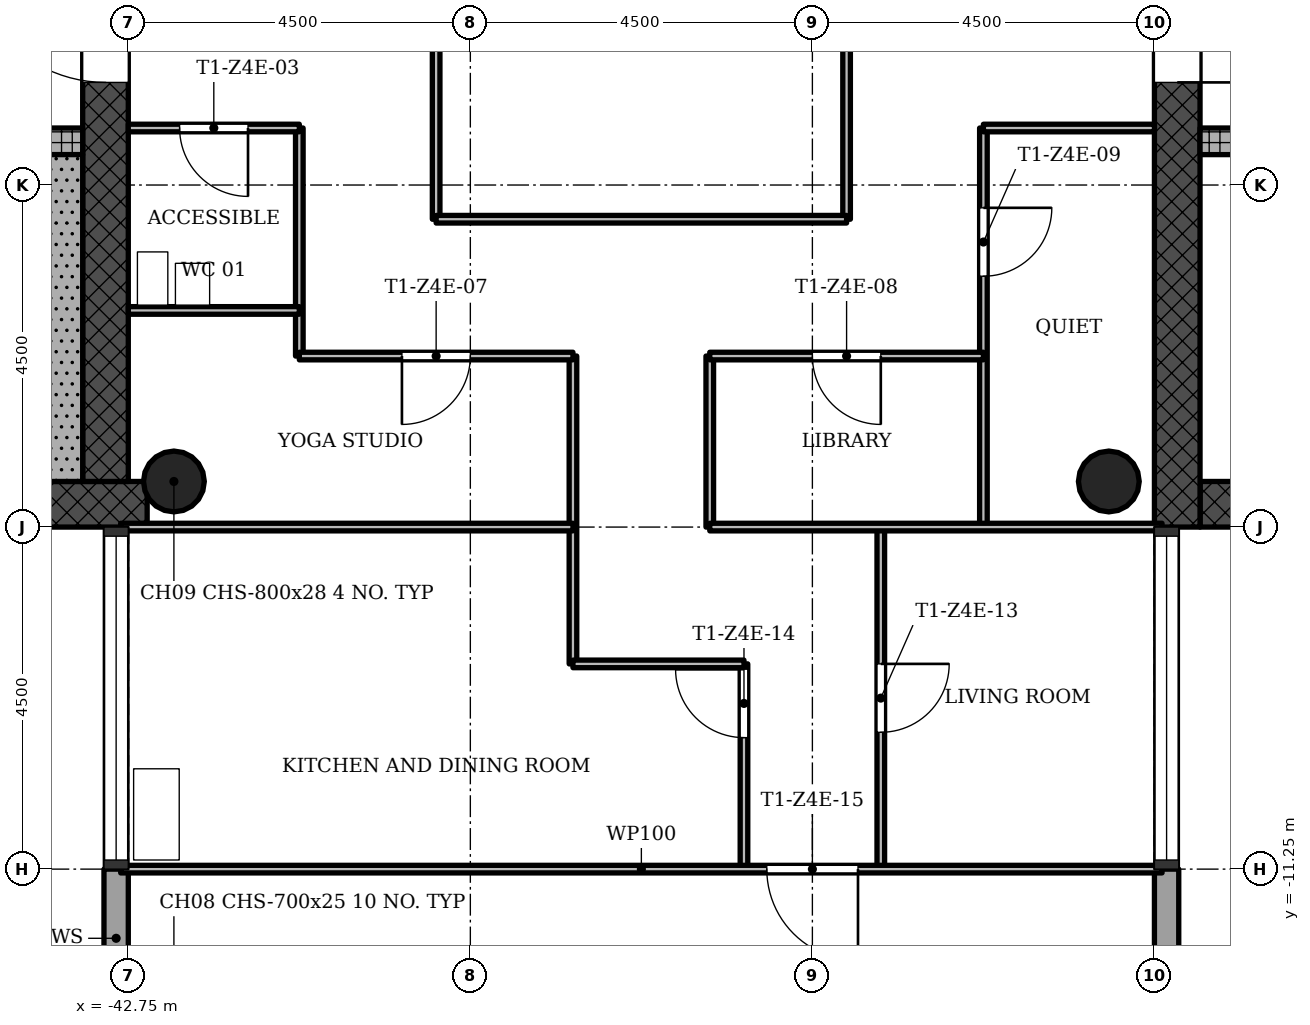
"""IFC4 building model, lengths in metres.
Left out: names, types, materials, properties, quantities, classifications, styles, units other than length and angle.
Written with IfcOpenShell. Run it as: python <this file> out.ifc"""

import sys

from ifc_helpers import new_model, si_unit, direction, frame, frame_2d, origin, origin_2d, place, context, subcontext, project, spatial, rectangle, hollow_circle, extrude, element, fill, save


model = new_model("IFC4")
c1 = context("Model", 3, precision=1e-05, world=origin(), true_north=direction((0.0, 1.0)))
c2 = subcontext(c1, "Body", "Model", "MODEL_VIEW")
j1 = project(units=[si_unit("LENGTHUNIT", "METRE"), si_unit("PLANEANGLEUNIT", "RADIAN")], contexts=[c1])
p1 = place(None, origin())
s1 = spatial("IfcSite", under=j1, at=p1, CompositionType="ELEMENT")
p2 = place(p1, origin())
s2 = spatial("IfcBuilding", under=s1, at=p2, CompositionType="ELEMENT")
p3 = place(p2, frame((0.0, 0.0, 213.0)))
s3 = spatial("IfcBuildingStorey", under=s2, at=p3, CompositionType="ELEMENT", Elevation=213.0)
p4 = place(p3, frame((-28.65, -6.45, 0.0), z_axis=(0.0, 0.0, 1.0), x_axis=(1.0, 0.0, 0.0)))
e1 = element("IfcWall", 1, at=p4, inside=s3, PredefinedType="SHEAR", context=c2, shape_type="SweptSolid", body=[
    extrude(rectangle(XDim=8.4, YDim=0.6, at=frame_2d((4.2, 0.0))), origin(), (0.0, 0.0, 1.0), 3.4),
])
p5 = place(p3, frame((-28.95, 6.15, 0.0), z_axis=(0.0, 0.0, 1.0), x_axis=(0.0, -1.0, 0.0)))
e2 = element("IfcWall", 2, at=p5, inside=s3, PredefinedType="SHEAR", context=c2, shape_type="SweptSolid", body=[
    extrude(rectangle(XDim=12.9, YDim=0.6, at=frame_2d((6.45, 0.0))), origin(), (0.0, 0.0, 1.0), 3.4),
])
p6 = place(p5, frame((5.25, 0.0, 0.0)))
e3 = element("IfcOpeningElement", 3, at=p6, cuts=e2, PredefinedType="OPENING", context=c2, shape_type="SweptSolid", body=[
    extrude(rectangle(XDim=1.8, YDim=2.1, at=frame_2d((0.9, 1.05))), frame((0.0, 0.31, 0.0), z_axis=(0.0, -1.0, 0.0), x_axis=(1.0, 0.0, 0.0)), (0.0, 0.0, 1.0), 0.62),
])
p7 = place(p3, frame((-28.65, -1.675, 0.0), z_axis=(0.0, 0.0, 1.0), x_axis=(1.0, 0.0, 0.0)))
e4 = element("IfcWall", 4, at=p7, inside=s3, PredefinedType="SHEAR", context=c2, shape_type="SweptSolid", body=[
    extrude(rectangle(XDim=7.8, YDim=0.35, at=frame_2d((3.9, 0.0))), origin(), (0.0, 0.0, 1.0), 3.4),
])
p8 = place(p7, frame((1.15, 0.0, 0.0)))
e5 = element("IfcOpeningElement", 5, at=p8, cuts=e4, PredefinedType="OPENING", context=c2, shape_type="SweptSolid", body=[
    extrude(rectangle(XDim=1.1, YDim=2.1, at=frame_2d((0.55, 1.05))), frame((0.0, 0.185, 0.0), z_axis=(0.0, -1.0, 0.0), x_axis=(1.0, 0.0, 0.0)), (0.0, 0.0, 1.0), 0.37),
])
p9 = place(p7, frame((3.35, 0.0, 0.0)))
e6 = element("IfcOpeningElement", 6, at=p9, cuts=e4, PredefinedType="OPENING", context=c2, shape_type="SweptSolid", body=[
    extrude(rectangle(XDim=1.1, YDim=2.1, at=frame_2d((0.55, 1.05))), frame((0.0, 0.185, 0.0), z_axis=(0.0, -1.0, 0.0), x_axis=(1.0, 0.0, 0.0)), (0.0, 0.0, 1.0), 0.37),
])
p10 = place(p7, frame((5.55, 0.0, 0.0)))
e7 = element("IfcOpeningElement", 7, at=p10, cuts=e4, PredefinedType="OPENING", context=c2, shape_type="SweptSolid", body=[
    extrude(rectangle(XDim=1.1, YDim=2.1, at=frame_2d((0.55, 1.05))), frame((0.0, 0.185, 0.0), z_axis=(0.0, -1.0, 0.0), x_axis=(1.0, 0.0, 0.0)), (0.0, 0.0, 1.0), 0.37),
])
p11 = place(p3, frame((-51.15, -6.45, 0.0), z_axis=(0.0, 0.0, 1.0), x_axis=(1.0, 0.0, 0.0)))
e8 = element("IfcWall", 8, at=p11, inside=s3, PredefinedType="SHEAR", context=c2, shape_type="SweptSolid", body=[
    extrude(rectangle(XDim=8.648, YDim=0.6, at=frame_2d((4.324, 0.0))), origin(), (0.0, 0.0, 1.0), 3.4),
])
p12 = place(p3, frame((-43.05, -6.15, 0.0), z_axis=(0.0, 0.0, 1.0), x_axis=(0.0, 1.0, 0.0)))
e9 = element("IfcWall", 9, at=p12, inside=s3, PredefinedType="SHEAR", context=c2, shape_type="SweptSolid", body=[
    extrude(rectangle(XDim=12.9, YDim=0.6, at=frame_2d((6.45, 0.0))), origin(), (0.0, 0.0, 1.0), 3.4),
])
p13 = place(p12, frame((5.25, 0.0, 0.0)))
e10 = element("IfcOpeningElement", 10, at=p13, cuts=e9, PredefinedType="OPENING", context=c2, shape_type="SweptSolid", body=[
    extrude(rectangle(XDim=1.8, YDim=2.1, at=frame_2d((0.9, 1.05))), frame((0.0, 0.31, 0.0), z_axis=(0.0, -1.0, 0.0), x_axis=(1.0, 0.0, 0.0)), (0.0, 0.0, 1.0), 0.62),
])
p14 = place(p3, frame((-51.15, -1.675, 0.0), z_axis=(0.0, 0.0, 1.0), x_axis=(1.0, 0.0, 0.0)))
e11 = element("IfcWall", 11, at=p14, inside=s3, PredefinedType="SHEAR", context=c2, shape_type="SweptSolid", body=[
    extrude(rectangle(XDim=7.8, YDim=0.35, at=frame_2d((3.9, 0.0))), origin(), (0.0, 0.0, 1.0), 3.4),
])
p15 = place(p14, frame((5.85, 0.0, 0.0)))
e12 = element("IfcOpeningElement", 12, at=p15, cuts=e11, PredefinedType="OPENING", context=c2, shape_type="SweptSolid", body=[
    extrude(rectangle(XDim=0.9, YDim=2.1, at=frame_2d((0.45, 1.05))), frame((0.0, 0.185, 0.0), z_axis=(0.0, -1.0, 0.0), x_axis=(1.0, 0.0, 0.0)), (0.0, 0.0, 1.0), 0.37),
])
for number, where, z_axis, x_axis in (
    (13, (-42.15, -6.15, 0.0), (0.0, 0.0, 1.0), (1.0, 0.0, 0.0)),
    (14, (-29.85, -6.15, 0.0), (0.0, 0.0, 1.0), (1.0, 0.0, 0.0)),
):
    element("IfcColumn", number, at=place(p3, frame(where, z_axis=z_axis, x_axis=x_axis)), inside=s3, PredefinedType="COLUMN", context=c2, shape_type="SweptSolid", body=[
        extrude(hollow_circle(Radius=0.4, WallThickness=0.028, at=origin_2d()), origin(), (0.0, 0.0, 1.0), 3.4),
    ])
p16 = place(p3, frame((-42.91, -11.25, -0.3), z_axis=(0.0, 0.0, 1.0), x_axis=(0.0, -1.0, 0.0)))
e15 = element("IfcWall", 15, at=p16, inside=s3, PredefinedType="STANDARD", context=c2, shape_type="SweptSolid", body=[
    extrude(rectangle(XDim=1.82, YDim=0.32, at=frame_2d((0.91, 0.0))), origin(), (0.0, 0.0, 1.0), 3.4),
])
p17 = place(p3, frame((-29.09, -12.75, -0.3), z_axis=(0.0, 0.0, 1.0), x_axis=(0.0, 1.0, 0.0)))
e16 = element("IfcWall", 16, at=p17, inside=s3, PredefinedType="STANDARD", context=c2, shape_type="SweptSolid", body=[
    extrude(rectangle(XDim=1.5, YDim=0.32, at=frame_2d((0.75, 0.0))), origin(), (0.0, 0.0, 1.0), 3.4),
])
p18 = place(p3, frame((-40.5, -4.5, 0.0), z_axis=(0.0, 0.0, 1.0), x_axis=(0.0, 1.0, 0.0)))
e17 = element("IfcWall", 17, at=p18, inside=s3, PredefinedType="PARTITIONING", context=c2, shape_type="SweptSolid", body=[
    extrude(rectangle(XDim=3.0, YDim=0.1, at=frame_2d((1.5, 0.0))), origin(), (0.0, 0.0, 1.0), 3.0),
])
p19 = place(p3, frame((-38.7, -2.7, 0.0), z_axis=(0.0, 0.0, 1.0), x_axis=(0.0, 1.0, 0.0)))
e18 = element("IfcWall", 18, at=p19, inside=s3, PredefinedType="PARTITIONING", context=c2, shape_type="SweptSolid", body=[
    extrude(rectangle(XDim=5.4, YDim=0.1, at=frame_2d((2.7, 0.0))), origin(), (0.0, 0.0, 1.0), 3.0),
])
p20 = place(p3, frame((-36.9, -8.55, 0.0), z_axis=(0.0, 0.0, 1.0), x_axis=(0.0, 1.0, 0.0)))
e19 = element("IfcWall", 19, at=p20, inside=s3, PredefinedType="PARTITIONING", context=c2, shape_type="SweptSolid", body=[
    extrude(rectangle(XDim=4.05, YDim=0.1, at=frame_2d((2.025, 0.0))), origin(), (0.0, 0.0, 1.0), 3.0),
])
p21 = place(p3, frame((-35.1, -6.75, 0.0), z_axis=(0.0, 0.0, 1.0), x_axis=(0.0, 1.0, 0.0)))
e20 = element("IfcWall", 20, at=p21, inside=s3, PredefinedType="PARTITIONING", context=c2, shape_type="SweptSolid", body=[
    extrude(rectangle(XDim=2.25, YDim=0.1, at=frame_2d((1.125, 0.0))), origin(), (0.0, 0.0, 1.0), 3.0),
])
p22 = place(p3, frame((-34.65, -11.25, 0.0), z_axis=(0.0, 0.0, 1.0), x_axis=(0.0, 1.0, 0.0)))
e21 = element("IfcWall", 21, at=p22, inside=s3, PredefinedType="PARTITIONING", context=c2, shape_type="SweptSolid", body=[
    extrude(rectangle(XDim=2.7, YDim=0.1, at=frame_2d((1.35, 0.0))), origin(), (0.0, 0.0, 1.0), 3.0),
])
p23 = place(p22, frame((1.73, 0.0, 0.0)))
e22 = element("IfcOpeningElement", 22, at=p23, cuts=e21, PredefinedType="OPENING", context=c2, shape_type="SweptSolid", body=[
    extrude(rectangle(XDim=0.9, YDim=2.1, at=frame_2d((0.45, 1.05))), frame((0.0, 0.06, 0.0), z_axis=(0.0, -1.0, 0.0), x_axis=(1.0, 0.0, 0.0)), (0.0, 0.0, 1.0), 0.12),
])
p24 = place(p3, frame((-33.3, -2.7, 0.0), z_axis=(0.0, 0.0, 1.0), x_axis=(0.0, 1.0, 0.0)))
e23 = element("IfcWall", 23, at=p24, inside=s3, PredefinedType="PARTITIONING", context=c2, shape_type="SweptSolid", body=[
    extrude(rectangle(XDim=5.4, YDim=0.1, at=frame_2d((2.7, 0.0))), origin(), (0.0, 0.0, 1.0), 3.0),
])
p25 = place(p24, frame((2.25, 0.0, 0.0)))
e24 = element("IfcOpeningElement", 24, at=p25, cuts=e23, PredefinedType="OPENING", context=c2, shape_type="SweptSolid", body=[
    extrude(rectangle(XDim=0.9, YDim=2.1, at=frame_2d((0.45, 1.05))), frame((0.0, 0.06, 0.0), z_axis=(0.0, -1.0, 0.0), x_axis=(1.0, 0.0, 0.0)), (0.0, 0.0, 1.0), 0.12),
])
p26 = place(p3, frame((-32.85, -11.25, 0.0), z_axis=(0.0, 0.0, 1.0), x_axis=(0.0, 1.0, 0.0)))
e25 = element("IfcWall", 25, at=p26, inside=s3, PredefinedType="PARTITIONING", context=c2, shape_type="SweptSolid", body=[
    extrude(rectangle(XDim=4.5, YDim=0.1, at=frame_2d((2.25, 0.0))), origin(), (0.0, 0.0, 1.0), 3.0),
])
p27 = place(p26, frame((1.8, 0.0, 0.0)))
e26 = element("IfcOpeningElement", 26, at=p27, cuts=e25, PredefinedType="OPENING", context=c2, shape_type="SweptSolid", body=[
    extrude(rectangle(XDim=0.9, YDim=2.1, at=frame_2d((0.45, 1.05))), frame((0.0, 0.06, 0.0), z_axis=(0.0, -1.0, 0.0), x_axis=(1.0, 0.0, 0.0)), (0.0, 0.0, 1.0), 0.12),
])
p28 = place(p3, frame((-31.5, -6.75, 0.0), z_axis=(0.0, 0.0, 1.0), x_axis=(0.0, 1.0, 0.0)))
e27 = element("IfcWall", 27, at=p28, inside=s3, PredefinedType="PARTITIONING", context=c2, shape_type="SweptSolid", body=[
    extrude(rectangle(XDim=5.25, YDim=0.1, at=frame_2d((2.625, 0.0))), origin(), (0.0, 0.0, 1.0), 3.0),
])
p29 = place(p28, frame((3.3, 0.0, 0.0)))
e28 = element("IfcOpeningElement", 28, at=p29, cuts=e27, PredefinedType="OPENING", context=c2, shape_type="SweptSolid", body=[
    extrude(rectangle(XDim=0.9, YDim=2.1, at=frame_2d((0.45, 1.05))), frame((0.0, 0.06, 0.0), z_axis=(0.0, -1.0, 0.0), x_axis=(1.0, 0.0, 0.0)), (0.0, 0.0, 1.0), 0.12),
])
p30 = place(p3, frame((-42.85, -11.25, 0.0), z_axis=(0.0, 0.0, 1.0), x_axis=(1.0, 0.0, 0.0)))
e29 = element("IfcWall", 29, at=p30, inside=s3, PredefinedType="PARTITIONING", context=c2, shape_type="SweptSolid", body=[
    extrude(rectangle(XDim=13.7, YDim=0.1, at=frame_2d((6.85, 0.0))), origin(), (0.0, 0.0, 1.0), 3.0),
])
p31 = place(p30, frame((8.5, 0.0, 0.0)))
e30 = element("IfcOpeningElement", 30, at=p31, cuts=e29, PredefinedType="OPENING", context=c2, shape_type="SweptSolid", body=[
    extrude(rectangle(XDim=1.2, YDim=2.1, at=frame_2d((0.6, 1.05))), frame((0.0, 0.06, 0.0), z_axis=(0.0, -1.0, 0.0), x_axis=(1.0, 0.0, 0.0)), (0.0, 0.0, 1.0), 0.12),
])
p32 = place(p3, frame((-36.9, -8.55, 0.0), z_axis=(0.0, 0.0, 1.0), x_axis=(1.0, 0.0, 0.0)))
e31 = element("IfcWall", 31, at=p32, inside=s3, PredefinedType="PARTITIONING", context=c2, shape_type="SweptSolid", body=[
    extrude(rectangle(XDim=2.25, YDim=0.1, at=frame_2d((1.125, 0.0))), origin(), (0.0, 0.0, 1.0), 3.0),
])
for number, where, z_axis, x_axis in (
    (32, (-42.85, -6.75, 0.0), (0.0, 0.0, 1.0), (1.0, 0.0, 0.0)),
    (33, (-35.1, -6.75, 0.0), (0.0, 0.0, 1.0), (1.0, 0.0, 0.0)),
):
    element("IfcWall", number, at=place(p3, frame(where, z_axis=z_axis, x_axis=x_axis)), inside=s3, PredefinedType="PARTITIONING", context=c2, shape_type="SweptSolid", body=[
        extrude(rectangle(XDim=5.95, YDim=0.1, at=frame_2d((2.975, 0.0))), origin(), (0.0, 0.0, 1.0), 3.0),
    ])
p33 = place(p3, frame((-40.5, -4.5, 0.0), z_axis=(0.0, 0.0, 1.0), x_axis=(1.0, 0.0, 0.0)))
e34 = element("IfcWall", 34, at=p33, inside=s3, PredefinedType="PARTITIONING", context=c2, shape_type="SweptSolid", body=[
    extrude(rectangle(XDim=3.6, YDim=0.1, at=frame_2d((1.8, 0.0))), origin(), (0.0, 0.0, 1.0), 3.0),
])
p34 = place(p33, frame((1.35, 0.0, 0.0)))
e35 = element("IfcOpeningElement", 35, at=p34, cuts=e34, PredefinedType="OPENING", context=c2, shape_type="SweptSolid", body=[
    extrude(rectangle(XDim=0.9, YDim=2.1, at=frame_2d((0.45, 1.05))), frame((0.0, 0.06, 0.0), z_axis=(0.0, -1.0, 0.0), x_axis=(1.0, 0.0, 0.0)), (0.0, 0.0, 1.0), 0.12),
])
p35 = place(p3, frame((-35.1, -4.5, 0.0), z_axis=(0.0, 0.0, 1.0), x_axis=(1.0, 0.0, 0.0)))
e36 = element("IfcWall", 36, at=p35, inside=s3, PredefinedType="PARTITIONING", context=c2, shape_type="SweptSolid", body=[
    extrude(rectangle(XDim=3.6, YDim=0.1, at=frame_2d((1.8, 0.0))), origin(), (0.0, 0.0, 1.0), 3.0),
])
p36 = place(p35, frame((1.35, 0.0, 0.0)))
e37 = element("IfcOpeningElement", 37, at=p36, cuts=e36, PredefinedType="OPENING", context=c2, shape_type="SweptSolid", body=[
    extrude(rectangle(XDim=0.9, YDim=2.1, at=frame_2d((0.45, 1.05))), frame((0.0, 0.06, 0.0), z_axis=(0.0, -1.0, 0.0), x_axis=(1.0, 0.0, 0.0)), (0.0, 0.0, 1.0), 0.12),
])
p37 = place(p3, frame((-42.75, -3.9, 0.0), z_axis=(0.0, 0.0, 1.0), x_axis=(1.0, 0.0, 0.0)))
e38 = element("IfcWall", 38, at=p37, inside=s3, PredefinedType="PARTITIONING", context=c2, shape_type="SweptSolid", body=[
    extrude(rectangle(XDim=2.25, YDim=0.1, at=frame_2d((1.125, 0.0))), origin(), (0.0, 0.0, 1.0), 3.0),
])
p38 = place(p3, frame((-38.7, -2.7, 0.0), z_axis=(0.0, 0.0, 1.0), x_axis=(1.0, 0.0, 0.0)))
e39 = element("IfcWall", 39, at=p38, inside=s3, PredefinedType="PARTITIONING", context=c2, shape_type="SweptSolid", body=[
    extrude(rectangle(XDim=5.4, YDim=0.1, at=frame_2d((2.7, 0.0))), origin(), (0.0, 0.0, 1.0), 3.0),
])
p39 = place(p3, frame((-42.75, -1.5, 0.0), z_axis=(0.0, 0.0, 1.0), x_axis=(1.0, 0.0, 0.0)))
e40 = element("IfcWall", 40, at=p39, inside=s3, PredefinedType="PARTITIONING", context=c2, shape_type="SweptSolid", body=[
    extrude(rectangle(XDim=2.25, YDim=0.1, at=frame_2d((1.125, 0.0))), origin(), (0.0, 0.0, 1.0), 3.0),
])
p40 = place(p39, frame((0.675, 0.0, 0.0)))
e41 = element("IfcOpeningElement", 41, at=p40, cuts=e40, PredefinedType="OPENING", context=c2, shape_type="SweptSolid", body=[
    extrude(rectangle(XDim=0.9, YDim=2.1, at=frame_2d((0.45, 1.05))), frame((0.0, 0.06, 0.0), z_axis=(0.0, -1.0, 0.0), x_axis=(1.0, 0.0, 0.0)), (0.0, 0.0, 1.0), 0.12),
])
p41 = place(p3, frame((-31.5, -1.5, 0.0), z_axis=(0.0, 0.0, 1.0), x_axis=(1.0, 0.0, 0.0)))
e42 = element("IfcWall", 42, at=p41, inside=s3, PredefinedType="PARTITIONING", context=c2, shape_type="SweptSolid", body=[
    extrude(rectangle(XDim=2.25, YDim=0.1, at=frame_2d((1.125, 0.0))), origin(), (0.0, 0.0, 1.0), 3.0),
])
p42 = place(p3, frame((-43.65, -1.85, 0.0), z_axis=(0.0, 0.0, 1.0), x_axis=(0.0, -1.0, 0.0)))
e43 = element("IfcWall", 43, at=p42, inside=s3, PredefinedType="SHEAR", context=c2, shape_type="SweptSolid", body=[
    extrude(rectangle(XDim=4.3, YDim=0.6, at=frame_2d((2.15, 0.0))), origin(), (0.0, 0.0, 1.0), 3.4),
])
p43 = place(p40, origin())
e44 = element("IfcDoor", 44, at=p43, inside=s3, OperationType="SINGLE_SWING_RIGHT", PredefinedType="DOOR", context=c2, shape_type="SweptSolid", body=[
    extrude(rectangle(XDim=0.9, YDim=2.1, at=frame_2d((0.45, 1.05))), frame((0.0, 0.025, 0.0), z_axis=(0.0, -1.0, 0.0), x_axis=(1.0, 0.0, 0.0)), (0.0, 0.0, 1.0), 0.05),
])
fill(e41, e44)
p44 = place(p34, origin())
e45 = element("IfcDoor", 45, at=p44, inside=s3, OperationType="SINGLE_SWING_LEFT", PredefinedType="DOOR", context=c2, shape_type="SweptSolid", body=[
    extrude(rectangle(XDim=0.9, YDim=2.1, at=frame_2d((0.45, 1.05))), frame((0.0, 0.025, 0.0), z_axis=(0.0, -1.0, 0.0), x_axis=(1.0, 0.0, 0.0)), (0.0, 0.0, 1.0), 0.05),
])
fill(e35, e45)
p45 = place(p36, origin())
e46 = element("IfcDoor", 46, at=p45, inside=s3, OperationType="SINGLE_SWING_RIGHT", PredefinedType="DOOR", context=c2, shape_type="SweptSolid", body=[
    extrude(rectangle(XDim=0.9, YDim=2.1, at=frame_2d((0.45, 1.05))), frame((0.0, 0.025, 0.0), z_axis=(0.0, -1.0, 0.0), x_axis=(1.0, 0.0, 0.0)), (0.0, 0.0, 1.0), 0.05),
])
fill(e37, e46)
p46 = place(p29, origin())
e47 = element("IfcDoor", 47, at=p46, inside=s3, OperationType="SINGLE_SWING_RIGHT", PredefinedType="DOOR", context=c2, shape_type="SweptSolid", body=[
    extrude(rectangle(XDim=0.9, YDim=2.1, at=frame_2d((0.45, 1.05))), frame((0.0, 0.025, 0.0), z_axis=(0.0, -1.0, 0.0), x_axis=(1.0, 0.0, 0.0)), (0.0, 0.0, 1.0), 0.05),
])
fill(e28, e47)
p47 = place(p27, origin())
e48 = element("IfcDoor", 48, at=p47, inside=s3, OperationType="SINGLE_SWING_RIGHT", PredefinedType="DOOR", context=c2, shape_type="SweptSolid", body=[
    extrude(rectangle(XDim=0.9, YDim=2.1, at=frame_2d((0.45, 1.05))), frame((0.0, 0.025, 0.0), z_axis=(0.0, -1.0, 0.0), x_axis=(1.0, 0.0, 0.0)), (0.0, 0.0, 1.0), 0.05),
])
fill(e26, e48)
p48 = place(p23, origin())
e49 = element("IfcDoor", 49, at=p48, inside=s3, OperationType="SINGLE_SWING_LEFT", PredefinedType="DOOR", context=c2, shape_type="SweptSolid", body=[
    extrude(rectangle(XDim=0.9, YDim=2.1, at=frame_2d((0.45, 1.05))), frame((0.0, 0.025, 0.0), z_axis=(0.0, -1.0, 0.0), x_axis=(1.0, 0.0, 0.0)), (0.0, 0.0, 1.0), 0.05),
])
fill(e22, e49)
p49 = place(p31, origin())
e50 = element("IfcDoor", 50, at=p49, inside=s3, OperationType="SINGLE_SWING_RIGHT", PredefinedType="DOOR", context=c2, shape_type="SweptSolid", body=[
    extrude(rectangle(XDim=1.2, YDim=2.1, at=frame_2d((0.6, 1.05))), frame((0.0, 0.025, 0.0), z_axis=(0.0, -1.0, 0.0), x_axis=(1.0, 0.0, 0.0)), (0.0, 0.0, 1.0), 0.05),
])
fill(e30, e50)
p50 = place(p6, origin())
e51 = element("IfcDoor", 51, at=p50, inside=s3, OperationType="SINGLE_SWING_LEFT", PredefinedType="DOOR", context=c2, shape_type="SweptSolid", body=[
    extrude(rectangle(XDim=1.8, YDim=2.1, at=frame_2d((0.9, 1.05))), frame((0.0, 0.025, 0.0), z_axis=(0.0, -1.0, 0.0), x_axis=(1.0, 0.0, 0.0)), (0.0, 0.0, 1.0), 0.05),
])
fill(e3, e51)
p51 = place(p13, origin())
e52 = element("IfcDoor", 52, at=p51, inside=s3, OperationType="SINGLE_SWING_LEFT", PredefinedType="DOOR", context=c2, shape_type="SweptSolid", body=[
    extrude(rectangle(XDim=1.8, YDim=2.1, at=frame_2d((0.9, 1.05))), frame((0.0, 0.025, 0.0), z_axis=(0.0, -1.0, 0.0), x_axis=(1.0, 0.0, 0.0)), (0.0, 0.0, 1.0), 0.05),
])
fill(e10, e52)
save(model, sys.argv[1])
